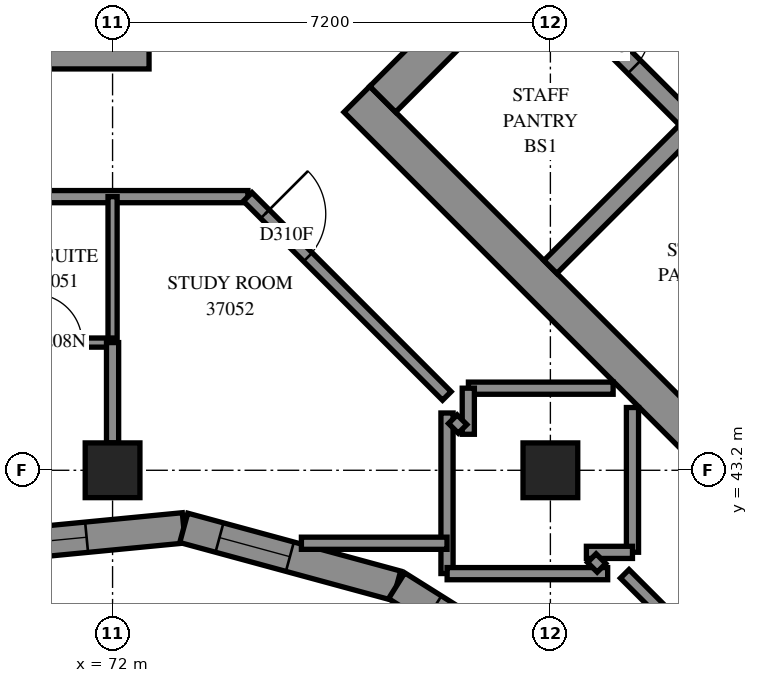
"""IFC4 building model, lengths in metres.
Left out: names, types, materials, properties, quantities, classifications, styles, units other than length and angle.
Written with IfcOpenShell. Run it as: python <this file> out.ifc"""

import sys

from ifc_helpers import new_model, si_unit, direction, frame, frame_2d, origin, origin_2d, place, context, subcontext, project, spatial, polyline, rectangle, outline, extrude, element, fill, save


model = new_model("IFC4")
c1 = context("Model", 3, precision=1e-05, world=origin(), true_north=direction((0.0, 1.0)))
c2 = subcontext(c1, "Body", "Model", "MODEL_VIEW")
j1 = project(units=[si_unit("LENGTHUNIT", "METRE"), si_unit("PLANEANGLEUNIT", "RADIAN")], contexts=[c1])
p1 = place(None, origin())
s1 = spatial("IfcSite", under=j1, at=p1, CompositionType="ELEMENT")
p2 = place(p1, origin())
s2 = spatial("IfcBuilding", under=s1, at=p2, CompositionType="ELEMENT")
p3 = place(p2, frame((0.0, 0.0, 138.8)))
s3 = spatial("IfcBuildingStorey", under=s2, at=p3, CompositionType="ELEMENT", Elevation=138.8)
for number, where, z_axis, x_axis in (
    (1, (72.0, 43.2, 0.0), (0.0, 0.0, 1.0), (1.0, 0.0, 0.0)),
    (2, (79.2, 43.2, 0.0), (0.0, 0.0, 1.0), (1.0, 0.0, 0.0)),
):
    element("IfcColumn", number, at=place(p3, frame(where, z_axis=z_axis, x_axis=x_axis)), inside=s3, PredefinedType="COLUMN", context=c2, shape_type="SweptSolid", body=[
        extrude(rectangle(XDim=0.9, YDim=0.9, at=origin_2d()), origin(), (0.0, 0.0, 1.0), 3.1),
    ])
for number, where, z_axis, x_axis in (
    (3, (57.0, 50.1, -0.3), (0.0, 0.0, 1.0), (1.0, 0.0, 0.0)),
    (4, (76.018, 49.302, -0.3), (0.0, 0.0, 1.0), (0.707, -0.707, 0.0)),
):
    element("IfcWall", number, at=place(p3, frame(where, z_axis=z_axis, x_axis=x_axis)), inside=s3, PredefinedType="SHEAR", context=c2, shape_type="SweptSolid", body=[
        extrude(rectangle(XDim=15.6, YDim=0.6, at=frame_2d((7.8, 0.0))), origin(), (0.0, 0.0, 1.0), 2.7),
    ])
p4 = place(p3, frame((76.442, 49.302, -0.3), z_axis=(0.0, 0.0, 1.0), x_axis=(0.7071067812, 0.7071067812, 0.0)))
e5 = element("IfcWall", 5, at=p4, inside=s3, PredefinedType="SHEAR", context=c2, shape_type="SweptSolid", body=[
    extrude(rectangle(XDim=14.4, YDim=0.6, at=frame_2d((7.2, 0.0))), origin(), (0.0, 0.0, 1.0), 2.7),
])
p5 = place(p4, frame((4.55, 0.0, 0.3)))
e6 = element("IfcOpeningElement", 6, at=p5, cuts=e5, PredefinedType="OPENING", context=c2, shape_type="SweptSolid", body=[
    extrude(rectangle(XDim=1.1, YDim=2.1, at=frame_2d((0.55, 1.05))), frame((0.0, 0.31, 0.0), z_axis=(0.0, -1.0, 0.0), x_axis=(1.0, 0.0, 0.0)), (0.0, 0.0, 1.0), 0.62),
])
p6 = place(p4, frame((11.35, 0.0, 0.3)))
e7 = element("IfcOpeningElement", 7, at=p6, cuts=e5, PredefinedType="OPENING", context=c2, shape_type="SweptSolid", body=[
    extrude(rectangle(XDim=1.1, YDim=2.1, at=frame_2d((0.55, 1.05))), frame((0.0, 0.31, 0.0), z_axis=(0.0, -1.0, 0.0), x_axis=(1.0, 0.0, 0.0)), (0.0, 0.0, 1.0), 0.62),
])
p7 = place(p3, frame((79.2, 46.544, 0.0), z_axis=(0.0, 0.0, 1.0), x_axis=(0.7071219326, 0.7070916295, 0.0)))
e8 = element("IfcWall", 8, at=p7, inside=s3, PredefinedType="SOLIDWALL", context=c2, shape_type="SweptSolid", body=[
    extrude(rectangle(XDim=3.3, YDim=0.3, at=frame_2d((1.65, 0.0))), origin(), (0.0, 0.0, 1.0), 3.1),
])
p8 = place(p3, frame((78.988, 51.423, 0.0), z_axis=(0.0, 0.0, 1.0), x_axis=(0.7071067812, -0.7071067812, 0.0)))
e9 = element("IfcWall", 9, at=p8, inside=s3, PredefinedType="SOLIDWALL", context=c2, shape_type="SweptSolid", body=[
    extrude(rectangle(XDim=14.4, YDim=0.3, at=frame_2d((7.2, 0.0))), origin(), (0.0, 0.0, 1.0), 3.1),
])
p9 = place(p8, frame((1.35, 0.0, 0.0)))
e10 = element("IfcOpeningElement", 10, at=p9, cuts=e9, PredefinedType="OPENING", context=c2, shape_type="SweptSolid", body=[
    extrude(rectangle(XDim=0.9, YDim=2.1, at=frame_2d((0.45, 1.05))), frame((0.0, 0.16, 0.0), z_axis=(0.0, -1.0, 0.0), x_axis=(1.0, 0.0, 0.0)), (0.0, 0.0, 1.0), 0.32),
])
p10 = place(p8, frame((4.95, 0.0, 0.0)))
e11 = element("IfcOpeningElement", 11, at=p10, cuts=e9, PredefinedType="OPENING", context=c2, shape_type="SweptSolid", body=[
    extrude(rectangle(XDim=0.9, YDim=2.1, at=frame_2d((0.45, 1.05))), frame((0.0, 0.16, 0.0), z_axis=(0.0, -1.0, 0.0), x_axis=(1.0, 0.0, 0.0)), (0.0, 0.0, 1.0), 0.32),
])
p11 = place(p8, frame((8.55, 0.0, 0.0)))
e12 = element("IfcOpeningElement", 12, at=p11, cuts=e9, PredefinedType="OPENING", context=c2, shape_type="SweptSolid", body=[
    extrude(rectangle(XDim=0.9, YDim=2.1, at=frame_2d((0.45, 1.05))), frame((0.0, 0.16, 0.0), z_axis=(0.0, -1.0, 0.0), x_axis=(1.0, 0.0, 0.0)), (0.0, 0.0, 1.0), 0.32),
])
p12 = place(p8, frame((12.05, 0.0, 0.0)))
e13 = element("IfcOpeningElement", 13, at=p12, cuts=e9, PredefinedType="OPENING", context=c2, shape_type="SweptSolid", body=[
    extrude(rectangle(XDim=1.1, YDim=2.1, at=frame_2d((0.55, 1.05))), frame((0.0, 0.16, 0.0), z_axis=(0.0, -1.0, 0.0), x_axis=(1.0, 0.0, 0.0)), (0.0, 0.0, 1.0), 0.32),
])
p13 = place(p3, frame((69.728, 41.921, 0.0), z_axis=(0.0, 0.0, 1.0), x_axis=(0.9953825051, 0.0959878563, 0.0)))
e14 = element("IfcWall", 14, at=p13, inside=s3, PredefinedType="SOLIDWALL", context=c2, shape_type="SweptSolid", body=[
    extrude(outline(polyline([(-0.024, -0.25), (3.413, -0.25), (3.505, 0.25), (0.024, 0.25), (-0.024, -0.25)])), origin(), (0.0, 0.0, 1.0), 3.1),
])
p14 = place(p13, frame((0.653, 0.0, 0.45)))
e15 = element("IfcOpeningElement", 15, at=p14, cuts=e14, PredefinedType="OPENING", context=c2, shape_type="SweptSolid", body=[
    extrude(rectangle(XDim=1.2, YDim=2.5, at=frame_2d((0.6, 1.25))), frame((0.0, 0.26, 0.0), z_axis=(0.0, -1.0, 0.0), x_axis=(1.0, 0.0, 0.0)), (0.0, 0.0, 1.0), 0.52),
])
p15 = place(p3, frame((73.171, 42.253, 0.0), z_axis=(0.0, 0.0, 1.0), x_axis=(0.9649873507, -0.2622964218, 0.0)))
e16 = element("IfcWall", 16, at=p15, inside=s3, PredefinedType="SOLIDWALL", context=c2, shape_type="SweptSolid", body=[
    extrude(outline(polyline([(0.046, -0.25), (3.591, -0.25), (3.666, 0.25), (-0.046, 0.25), (0.046, -0.25)])), origin(), (0.0, 0.0, 1.0), 3.1),
])
p16 = place(p15, frame((0.609, 0.0, 0.45)))
e17 = element("IfcOpeningElement", 17, at=p16, cuts=e16, PredefinedType="OPENING", context=c2, shape_type="SweptSolid", body=[
    extrude(rectangle(XDim=1.2, YDim=2.5, at=frame_2d((0.6, 1.25))), frame((0.0, 0.26, 0.0), z_axis=(0.0, -1.0, 0.0), x_axis=(1.0, 0.0, 0.0)), (0.0, 0.0, 1.0), 0.52),
])
p17 = place(p3, frame((76.672, 41.301, 0.0), z_axis=(0.0, 0.0, 1.0), x_axis=(0.8470056686, -0.5315838574, 0.0)))
e18 = element("IfcWall", 18, at=p17, inside=s3, PredefinedType="SOLIDWALL", context=c2, shape_type="SweptSolid", body=[
    extrude(outline(polyline([(0.037, -0.25), (4.207, -0.25), (4.284, 0.25), (-0.037, 0.25), (0.037, -0.25)])), origin(), (0.0, 0.0, 1.0), 3.1),
])
p18 = place(p17, frame((0.712, 0.0, 0.45)))
e19 = element("IfcOpeningElement", 19, at=p18, cuts=e18, PredefinedType="OPENING", context=c2, shape_type="SweptSolid", body=[
    extrude(rectangle(XDim=1.2, YDim=2.5, at=frame_2d((0.6, 1.25))), frame((0.0, 0.26, 0.0), z_axis=(0.0, -1.0, 0.0), x_axis=(1.0, 0.0, 0.0)), (0.0, 0.0, 1.0), 0.52),
])
p19 = place(p17, frame((2.285, 0.0, 0.45)))
e20 = element("IfcOpeningElement", 20, at=p19, cuts=e18, PredefinedType="OPENING", context=c2, shape_type="SweptSolid", body=[
    extrude(rectangle(XDim=1.2, YDim=2.5, at=frame_2d((0.6, 1.25))), frame((0.0, 0.26, 0.0), z_axis=(0.0, -1.0, 0.0), x_axis=(1.0, 0.0, 0.0)), (0.0, 0.0, 1.0), 0.52),
])
p20 = place(p3, frame((54.9, 47.7, 0.0), z_axis=(0.0, 0.0, 1.0), x_axis=(1.0, 0.0, 0.0)))
e21 = element("IfcWall", 21, at=p20, inside=s3, PredefinedType="PARTITIONING", context=c2, shape_type="SweptSolid", body=[
    extrude(rectangle(XDim=19.326, YDim=0.2, at=frame_2d((9.663, 0.0))), origin(), (0.0, 0.0, 1.0), 3.1),
])
p21 = place(p20, frame((5.0, 0.0, 0.0)))
e22 = element("IfcOpeningElement", 22, at=p21, cuts=e21, PredefinedType="OPENING", context=c2, shape_type="SweptSolid", body=[
    extrude(rectangle(XDim=0.9, YDim=2.1, at=frame_2d((0.45, 1.05))), frame((0.0, 0.11, 0.0), z_axis=(0.0, -1.0, 0.0), x_axis=(1.0, 0.0, 0.0)), (0.0, 0.0, 1.0), 0.22),
])
p22 = place(p20, frame((12.2, 0.0, 0.0)))
e23 = element("IfcOpeningElement", 23, at=p22, cuts=e21, PredefinedType="OPENING", context=c2, shape_type="SweptSolid", body=[
    extrude(rectangle(XDim=0.9, YDim=2.1, at=frame_2d((0.45, 1.05))), frame((0.0, 0.11, 0.0), z_axis=(0.0, -1.0, 0.0), x_axis=(1.0, 0.0, 0.0)), (0.0, 0.0, 1.0), 0.22),
])
p23 = place(p20, frame((6.7, 0.0, 0.0)))
e24 = element("IfcOpeningElement", 24, at=p23, cuts=e21, PredefinedType="OPENING", context=c2, shape_type="SweptSolid", body=[
    extrude(rectangle(XDim=0.9, YDim=2.1, at=frame_2d((0.45, 1.05))), frame((0.0, 0.11, 0.0), z_axis=(0.0, -1.0, 0.0), x_axis=(1.0, 0.0, 0.0)), (0.0, 0.0, 1.0), 0.22),
])
p24 = place(p20, frame((13.9, 0.0, 0.0)))
e25 = element("IfcOpeningElement", 25, at=p24, cuts=e21, PredefinedType="OPENING", context=c2, shape_type="SweptSolid", body=[
    extrude(rectangle(XDim=0.9, YDim=2.1, at=frame_2d((0.45, 1.05))), frame((0.0, 0.11, 0.0), z_axis=(0.0, -1.0, 0.0), x_axis=(1.0, 0.0, 0.0)), (0.0, 0.0, 1.0), 0.22),
])
p25 = place(p3, frame((80.423, 41.497, 0.0), z_axis=(0.0, 0.0, 1.0), x_axis=(0.7071067812, -0.7071067812, 0.0)))
e26 = element("IfcWall", 26, at=p25, inside=s3, PredefinedType="PARTITIONING", context=c2, shape_type="SweptSolid", body=[
    extrude(rectangle(XDim=9.065, YDim=0.2, at=frame_2d((4.532, 0.0))), origin(), (0.0, 0.0, 1.0), 3.1),
])
p26 = place(p3, frame((74.223, 47.697, 0.0), z_axis=(0.0, 0.0, 1.0), x_axis=(0.7071067812, -0.7071067812, 0.0)))
e27 = element("IfcWall", 27, at=p26, inside=s3, PredefinedType="PARTITIONING", context=c2, shape_type="SweptSolid", body=[
    extrude(rectangle(XDim=4.63, YDim=0.2, at=frame_2d((2.315, 0.0))), origin(), (0.0, 0.0, 1.0), 3.1),
])
p27 = place(p26, frame((0.401, 0.0, 0.0)))
e28 = element("IfcOpeningElement", 28, at=p27, cuts=e27, PredefinedType="OPENING", context=c2, shape_type="SweptSolid", body=[
    extrude(rectangle(XDim=1.0, YDim=2.1, at=frame_2d((0.5, 1.05))), frame((0.0, 0.11, 0.0), z_axis=(0.0, -1.0, 0.0), x_axis=(1.0, 0.0, 0.0)), (0.0, 0.0, 1.0), 0.22),
])
for number, where, z_axis, x_axis in (
    (29, (77.5, 41.502, 0.0), (0.0, 0.0, 1.0), (0.0, 1.0, 0.0)),
    (30, (77.502, 41.5, 0.0), (0.0, 0.0, 1.0), (1.0, 0.0, 0.0)),
):
    element("IfcWall", number, at=place(p3, frame(where, z_axis=z_axis, x_axis=x_axis)), inside=s3, PredefinedType="PARTITIONING", context=c2, shape_type="SweptSolid", body=[
        extrude(rectangle(XDim=2.64, YDim=0.2, at=frame_2d((1.32, 0.0))), origin(), (0.0, 0.0, 1.0), 3.1),
    ])
p28 = place(p3, frame((72.0, 45.3, 0.0), z_axis=(0.0, 0.0, 1.0), x_axis=(0.0, 1.0, 0.0)))
e31 = element("IfcWall", 31, at=p28, inside=s3, PredefinedType="PARTITIONING", context=c2, shape_type="SweptSolid", body=[
    extrude(rectangle(XDim=2.4, YDim=0.15, at=frame_2d((1.2, 0.0))), origin(), (0.0, 0.0, 1.0), 3.1),
])
p29 = place(p3, frame((75.106, 42.0, 0.0), z_axis=(0.0, 0.0, 1.0), x_axis=(1.0, 0.0, 0.0)))
e32 = element("IfcWall", 32, at=p29, inside=s3, PredefinedType="PARTITIONING", context=c2, shape_type="SweptSolid", body=[
    extrude(rectangle(XDim=2.394, YDim=0.2, at=frame_2d((1.197, 0.0))), origin(), (0.0, 0.0, 1.0), 3.1),
])
for number, where, z_axis, x_axis in (
    (33, (80.55, 41.852, 0.0), (0.0, 0.0, 1.0), (0.0, 1.0, 0.0)),
    (34, (77.852, 44.55, 0.0), (0.0, 0.0, 1.0), (1.0, 0.0, 0.0)),
):
    element("IfcWall", number, at=place(p3, frame(where, z_axis=z_axis, x_axis=x_axis)), inside=s3, PredefinedType="PARTITIONING", context=c2, shape_type="SweptSolid", body=[
        extrude(rectangle(XDim=2.38, YDim=0.2, at=frame_2d((1.19, 0.0))), origin(), (0.0, 0.0, 1.0), 3.1),
    ])
p30 = place(p3, frame((70.1, 45.3, 0.0), z_axis=(0.0, 0.0, 1.0), x_axis=(1.0, 0.0, 0.0)))
e35 = element("IfcWall", 35, at=p30, inside=s3, PredefinedType="PARTITIONING", context=c2, shape_type="SweptSolid", body=[
    extrude(rectangle(XDim=1.9, YDim=0.15, at=frame_2d((0.95, 0.0))), origin(), (0.0, 0.0, 1.0), 3.1),
])
p31 = place(p30, frame((0.598, 0.0, 0.0)))
e36 = element("IfcOpeningElement", 36, at=p31, cuts=e35, PredefinedType="OPENING", context=c2, shape_type="SweptSolid", body=[
    extrude(rectangle(XDim=0.8, YDim=2.1, at=frame_2d((0.4, 1.05))), frame((0.0, 0.085, 0.0), z_axis=(0.0, -1.0, 0.0), x_axis=(1.0, 0.0, 0.0)), (0.0, 0.0, 1.0), 0.17),
])
p32 = place(p3, frame((72.0, 43.65, 0.0), z_axis=(0.0, 0.0, 1.0), x_axis=(0.0, 1.0, 0.0)))
e37 = element("IfcWall", 37, at=p32, inside=s3, PredefinedType="PARTITIONING", context=c2, shape_type="SweptSolid", body=[
    extrude(rectangle(XDim=1.65, YDim=0.2, at=frame_2d((0.825, 0.0))), origin(), (0.0, 0.0, 1.0), 3.1),
])
for number, where, z_axis, x_axis in (
    (38, (77.85, 43.792, 0.0), (0.0, 0.0, 1.0), (0.0, 1.0, 0.0)),
    (39, (79.792, 41.85, 0.0), (0.0, 0.0, 1.0), (1.0, 0.0, 0.0)),
):
    element("IfcWall", number, at=place(p3, frame(where, z_axis=z_axis, x_axis=x_axis)), inside=s3, PredefinedType="PARTITIONING", context=c2, shape_type="SweptSolid", body=[
        extrude(rectangle(XDim=0.758, YDim=0.2, at=frame_2d((0.379, 0.0))), origin(), (0.0, 0.0, 1.0), 3.1),
    ])
for number, where, z_axis, x_axis in (
    (40, (79.881, 41.755, 0.0), (0.0, 0.0, 1.0), (0.707, -0.707, 0.0)),
    (41, (77.596, 44.04, 0.0), (0.0, 0.0, 1.0), (0.707, -0.707, 0.0)),
):
    element("IfcWall", number, at=place(p3, frame(where, z_axis=z_axis, x_axis=x_axis)), inside=s3, PredefinedType="PARTITIONING", context=c2, shape_type="SweptSolid", body=[
        extrude(rectangle(XDim=0.225, YDim=0.2, at=frame_2d((0.113, 0.0))), origin(), (0.0, 0.0, 1.0), 3.1),
    ])
p33 = place(p14, origin())
e42 = element("IfcWindow", 42, at=p33, inside=s3, PartitioningType="SINGLE_PANEL", PredefinedType="WINDOW", context=c2, shape_type="SweptSolid", body=[
    extrude(rectangle(XDim=1.2, YDim=2.5, at=frame_2d((0.6, 1.25))), frame((0.0, 0.18, 0.0), z_axis=(0.0, -1.0, 0.0), x_axis=(1.0, 0.0, 0.0)), (0.0, 0.0, 1.0), 0.06),
])
fill(e15, e42)
p34 = place(p16, origin())
e43 = element("IfcWindow", 43, at=p34, inside=s3, PartitioningType="SINGLE_PANEL", PredefinedType="WINDOW", context=c2, shape_type="SweptSolid", body=[
    extrude(rectangle(XDim=1.2, YDim=2.5, at=frame_2d((0.6, 1.25))), frame((0.0, 0.18, 0.0), z_axis=(0.0, -1.0, 0.0), x_axis=(1.0, 0.0, 0.0)), (0.0, 0.0, 1.0), 0.06),
])
fill(e17, e43)
p35 = place(p18, origin())
e44 = element("IfcWindow", 44, at=p35, inside=s3, PartitioningType="SINGLE_PANEL", PredefinedType="WINDOW", context=c2, shape_type="SweptSolid", body=[
    extrude(rectangle(XDim=1.2, YDim=2.5, at=frame_2d((0.6, 1.25))), frame((0.0, 0.18, 0.0), z_axis=(0.0, -1.0, 0.0), x_axis=(1.0, 0.0, 0.0)), (0.0, 0.0, 1.0), 0.06),
])
fill(e19, e44)
p36 = place(p9, origin())
e45 = element("IfcDoor", 45, at=p36, inside=s3, OperationType="SINGLE_SWING_LEFT", PredefinedType="DOOR", context=c2, shape_type="SweptSolid", body=[
    extrude(rectangle(XDim=0.9, YDim=2.1, at=frame_2d((0.45, 1.05))), frame((0.0, 0.025, 0.0), z_axis=(0.0, -1.0, 0.0), x_axis=(1.0, 0.0, 0.0)), (0.0, 0.0, 1.0), 0.05),
])
fill(e10, e45)
p37 = place(p31, origin())
e46 = element("IfcDoor", 46, at=p37, inside=s3, OperationType="SINGLE_SWING_RIGHT", PredefinedType="DOOR", context=c2, shape_type="SweptSolid", body=[
    extrude(rectangle(XDim=0.8, YDim=2.1, at=frame_2d((0.4, 1.05))), frame((0.0, 0.025, 0.0), z_axis=(0.0, -1.0, 0.0), x_axis=(1.0, 0.0, 0.0)), (0.0, 0.0, 1.0), 0.05),
])
fill(e36, e46)
p38 = place(p27, origin())
e47 = element("IfcDoor", 47, at=p38, inside=s3, OperationType="SINGLE_SWING_LEFT", PredefinedType="DOOR", context=c2, shape_type="SweptSolid", body=[
    extrude(rectangle(XDim=1.0, YDim=2.1, at=frame_2d((0.5, 1.05))), frame((0.0, 0.025, 0.0), z_axis=(0.0, -1.0, 0.0), x_axis=(1.0, 0.0, 0.0)), (0.0, 0.0, 1.0), 0.05),
])
fill(e28, e47)
save(model, sys.argv[1])
